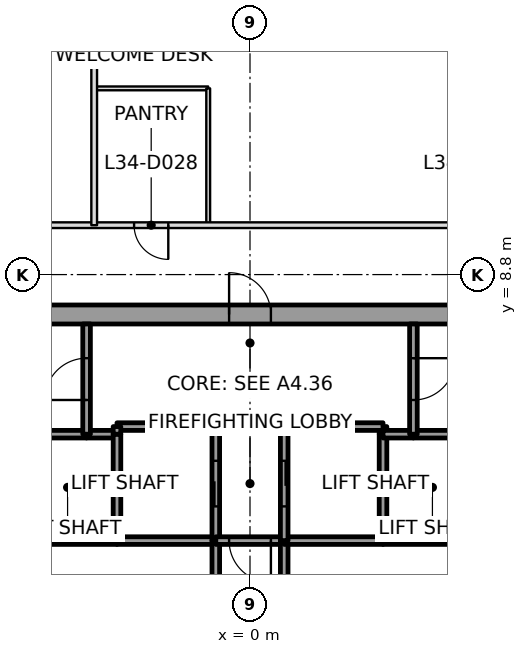
"""IFC4 building model, lengths in metres.
Left out: names, types, materials, properties, quantities, classifications, styles, units other than length and angle.
Written with IfcOpenShell. Run it as: python <this file> out.ifc"""

import sys

from ifc_helpers import new_model, si_unit, direction, frame, frame_2d, origin, place, context, subcontext, project, spatial, rectangle, extrude, element, fill, save


model = new_model("IFC4")
c1 = context("Model", 3, precision=1e-05, world=origin(), true_north=direction((0.0, 1.0)))
c2 = subcontext(c1, "Body", "Model", "MODEL_VIEW")
j1 = project(units=[si_unit("LENGTHUNIT", "METRE"), si_unit("PLANEANGLEUNIT", "RADIAN")], contexts=[c1])
p1 = place(None, origin())
s1 = spatial("IfcSite", under=j1, at=p1, CompositionType="ELEMENT")
p2 = place(p1, origin())
s2 = spatial("IfcBuilding", under=s1, at=p2, CompositionType="ELEMENT")
p3 = place(p2, frame((0.0, 0.0, 157.8)))
s3 = spatial("IfcBuildingStorey", under=s2, at=p3, CompositionType="ELEMENT", Elevation=157.8)
p4 = place(p3, frame((-11.0, 7.75, 0.0), z_axis=(0.0, 0.0, 1.0), x_axis=(1.0, 0.0, 0.0)))
e1 = element("IfcWall", 1, at=p4, inside=s3, PredefinedType="SHEAR", context=c2, shape_type="SweptSolid", body=[
    extrude(rectangle(XDim=22.0, YDim=0.5, at=frame_2d((11.0, 0.0))), origin(), (0.0, 0.0, 1.0), 4.0),
])
p5 = place(p4, frame((10.45, 0.0, 0.0)))
e2 = element("IfcOpeningElement", 2, at=p5, cuts=e1, PredefinedType="OPENING", context=c2, shape_type="SweptSolid", body=[
    extrude(rectangle(XDim=1.1, YDim=2.1, at=frame_2d((0.55, 1.05))), frame((0.0, 0.25, 0.0), z_axis=(0.0, -1.0, 0.0), x_axis=(1.0, 0.0, 0.0)), (0.0, 0.0, 1.0), 0.5),
])
p6 = place(p3, frame((-3.5, 1.8, 0.0), z_axis=(0.0, 0.0, 1.0), x_axis=(-1.0, 0.0, 0.0)))
e3 = element("IfcWall", 3, at=p6, inside=s3, PredefinedType="SOLIDWALL", context=c2, shape_type="SweptSolid", body=[
    extrude(rectangle(XDim=2.6, YDim=0.2, at=frame_2d((1.3, 0.0))), origin(), (0.0, 0.0, 1.0), 3.85),
])
p7 = place(p3, frame((-4.3, 4.6, 0.0), z_axis=(0.0, 0.0, 1.0), x_axis=(-1.0, 0.0, 0.0)))
e4 = element("IfcWall", 4, at=p7, inside=s3, PredefinedType="SOLIDWALL", context=c2, shape_type="SweptSolid", body=[
    extrude(rectangle(XDim=1.8, YDim=0.2, at=frame_2d((0.9, 0.0))), origin(), (0.0, 0.0, 1.0), 3.85),
])
p8 = place(p3, frame((-3.5, 4.6, 0.0), z_axis=(0.0, 0.0, 1.0), x_axis=(-1.0, 0.0, 0.0)))
e5 = element("IfcWall", 5, at=p8, inside=s3, PredefinedType="SOLIDWALL", context=c2, shape_type="SweptSolid", body=[
    extrude(rectangle(XDim=0.8, YDim=0.2, at=frame_2d((0.4, 0.0))), origin(), (0.0, 0.0, 1.0), 3.85),
])
p9 = place(p3, frame((-4.3, 4.6, 0.0), z_axis=(0.0, 0.0, 1.0), x_axis=(0.0, 1.0, 0.0)))
e6 = element("IfcWall", 6, at=p9, inside=s3, PredefinedType="SOLIDWALL", context=c2, shape_type="SweptSolid", body=[
    extrude(rectangle(XDim=2.9, YDim=0.2, at=frame_2d((1.45, 0.0))), origin(), (0.0, 0.0, 1.0), 3.85),
])
p10 = place(p9, frame((0.9, 0.0, 0.0)))
e7 = element("IfcOpeningElement", 7, at=p10, cuts=e6, PredefinedType="OPENING", context=c2, shape_type="SweptSolid", body=[
    extrude(rectangle(XDim=1.1, YDim=2.1, at=frame_2d((0.55, 1.05))), frame((0.0, 0.1, 0.0), z_axis=(0.0, -1.0, 0.0), x_axis=(1.0, 0.0, 0.0)), (0.0, 0.0, 1.0), 0.2),
])
p11 = place(p3, frame((-0.9, 1.8, 0.0), z_axis=(0.0, 0.0, 1.0), x_axis=(-1.0, 0.0, 0.0)))
e8 = element("IfcWall", 8, at=p11, inside=s3, PredefinedType="SOLIDWALL", context=c2, shape_type="SweptSolid", body=[
    extrude(rectangle(XDim=2.6, YDim=0.2, at=frame_2d((1.3, 0.0))), origin(), (0.0, 0.0, 1.0), 3.85),
])
p12 = place(p3, frame((-3.5, 4.6, 0.0), z_axis=(0.0, 0.0, 1.0), x_axis=(0.0, -1.0, 0.0)))
e9 = element("IfcWall", 9, at=p12, inside=s3, PredefinedType="SOLIDWALL", context=c2, shape_type="SweptSolid", body=[
    extrude(rectangle(XDim=2.8, YDim=0.2, at=frame_2d((1.4, 0.0))), origin(), (0.0, 0.0, 1.0), 3.85),
])
p13 = place(p3, frame((-0.9, 1.8, 0.0), z_axis=(0.0, 0.0, 1.0), x_axis=(0.0, 1.0, 0.0)))
e10 = element("IfcWall", 10, at=p13, inside=s3, PredefinedType="SOLIDWALL", context=c2, shape_type="SweptSolid", body=[
    extrude(rectangle(XDim=3.0, YDim=0.2, at=frame_2d((1.5, 0.0))), origin(), (0.0, 0.0, 1.0), 3.85),
])
p14 = place(p13, frame((0.9, 0.0, 0.0)))
e11 = element("IfcOpeningElement", 11, at=p14, cuts=e10, PredefinedType="OPENING", context=c2, shape_type="SweptSolid", body=[
    extrude(rectangle(XDim=1.2, YDim=2.1, at=frame_2d((0.6, 1.05))), frame((0.0, 0.1, 0.0), z_axis=(0.0, -1.0, 0.0), x_axis=(1.0, 0.0, 0.0)), (0.0, 0.0, 1.0), 0.2),
])
p15 = place(p3, frame((-0.9, 4.8, 0.0), z_axis=(0.0, 0.0, 1.0), x_axis=(-1.0, 0.0, 0.0)))
e12 = element("IfcWall", 12, at=p15, inside=s3, PredefinedType="SOLIDWALL", context=c2, shape_type="SweptSolid", body=[
    extrude(rectangle(XDim=2.6, YDim=0.2, at=frame_2d((1.3, 0.0))), origin(), (0.0, 0.0, 1.0), 3.85),
])
p16 = place(p3, frame((-3.5, 4.8, 0.0), z_axis=(0.0, 0.0, 1.0), x_axis=(0.0, -1.0, 0.0)))
e13 = element("IfcWall", 13, at=p16, inside=s3, PredefinedType="SOLIDWALL", context=c2, shape_type="SweptSolid", body=[
    extrude(rectangle(XDim=0.2, YDim=0.2, at=frame_2d((0.1, 0.0))), origin(), (0.0, 0.0, 1.0), 3.85),
])
p17 = place(p3, frame((-0.9, 1.8, 0.0), z_axis=(0.0, 0.0, 1.0), x_axis=(0.0, -1.0, 0.0)))
e14 = element("IfcWall", 14, at=p17, inside=s3, PredefinedType="SOLIDWALL", context=c2, shape_type="SweptSolid", body=[
    extrude(rectangle(XDim=3.6, YDim=0.2, at=frame_2d((1.8, 0.0))), origin(), (0.0, 0.0, 1.0), 3.85),
])
p18 = place(p17, frame((1.05, 0.0, 0.0)))
e15 = element("IfcOpeningElement", 15, at=p18, cuts=e14, PredefinedType="OPENING", context=c2, shape_type="SweptSolid", body=[
    extrude(rectangle(XDim=1.5, YDim=2.1, at=frame_2d((0.75, 1.05))), frame((0.0, 0.1, 0.0), z_axis=(0.0, -1.0, 0.0), x_axis=(1.0, 0.0, 0.0)), (0.0, 0.0, 1.0), 0.2),
])
p19 = place(p3, frame((0.9, 1.8, 0.0), z_axis=(0.0, 0.0, 1.0), x_axis=(-1.0, 0.0, 0.0)))
e16 = element("IfcWall", 16, at=p19, inside=s3, PredefinedType="SOLIDWALL", context=c2, shape_type="SweptSolid", body=[
    extrude(rectangle(XDim=1.8, YDim=0.2, at=frame_2d((0.9, 0.0))), origin(), (0.0, 0.0, 1.0), 3.85),
])
p20 = place(p19, frame((0.35, 0.0, 0.0)))
e17 = element("IfcOpeningElement", 17, at=p20, cuts=e16, PredefinedType="OPENING", context=c2, shape_type="SweptSolid", body=[
    extrude(rectangle(XDim=1.1, YDim=2.1, at=frame_2d((0.55, 1.05))), frame((0.0, 0.1, 0.0), z_axis=(0.0, -1.0, 0.0), x_axis=(1.0, 0.0, 0.0)), (0.0, 0.0, 1.0), 0.2),
])
p21 = place(p3, frame((0.9, -1.8, 0.0), z_axis=(0.0, 0.0, 1.0), x_axis=(0.0, 1.0, 0.0)))
e18 = element("IfcWall", 18, at=p21, inside=s3, PredefinedType="SOLIDWALL", context=c2, shape_type="SweptSolid", body=[
    extrude(rectangle(XDim=3.6, YDim=0.2, at=frame_2d((1.8, 0.0))), origin(), (0.0, 0.0, 1.0), 3.85),
])
p22 = place(p21, frame((1.05, 0.0, 0.0)))
e19 = element("IfcOpeningElement", 19, at=p22, cuts=e18, PredefinedType="OPENING", context=c2, shape_type="SweptSolid", body=[
    extrude(rectangle(XDim=1.5, YDim=2.1, at=frame_2d((0.75, 1.05))), frame((0.0, 0.1, 0.0), z_axis=(0.0, -1.0, 0.0), x_axis=(1.0, 0.0, 0.0)), (0.0, 0.0, 1.0), 0.2),
])
p23 = place(p3, frame((3.5, 1.8, 0.0), z_axis=(0.0, 0.0, 1.0), x_axis=(-1.0, 0.0, 0.0)))
e20 = element("IfcWall", 20, at=p23, inside=s3, PredefinedType="SOLIDWALL", context=c2, shape_type="SweptSolid", body=[
    extrude(rectangle(XDim=2.6, YDim=0.2, at=frame_2d((1.3, 0.0))), origin(), (0.0, 0.0, 1.0), 3.85),
])
p24 = place(p3, frame((3.5, 4.6, 0.0), z_axis=(0.0, 0.0, 1.0), x_axis=(0.0, 1.0, 0.0)))
e21 = element("IfcWall", 21, at=p24, inside=s3, PredefinedType="SOLIDWALL", context=c2, shape_type="SweptSolid", body=[
    extrude(rectangle(XDim=0.2, YDim=0.2, at=frame_2d((0.1, 0.0))), origin(), (0.0, 0.0, 1.0), 3.85),
])
p25 = place(p3, frame((3.5, 4.8, 0.0), z_axis=(0.0, 0.0, 1.0), x_axis=(-1.0, 0.0, 0.0)))
e22 = element("IfcWall", 22, at=p25, inside=s3, PredefinedType="SOLIDWALL", context=c2, shape_type="SweptSolid", body=[
    extrude(rectangle(XDim=2.6, YDim=0.2, at=frame_2d((1.3, 0.0))), origin(), (0.0, 0.0, 1.0), 3.85),
])
p26 = place(p3, frame((0.9, 4.8, 0.0), z_axis=(0.0, 0.0, 1.0), x_axis=(0.0, -1.0, 0.0)))
e23 = element("IfcWall", 23, at=p26, inside=s3, PredefinedType="SOLIDWALL", context=c2, shape_type="SweptSolid", body=[
    extrude(rectangle(XDim=3.0, YDim=0.2, at=frame_2d((1.5, 0.0))), origin(), (0.0, 0.0, 1.0), 3.85),
])
p27 = place(p26, frame((0.9, 0.0, 0.0)))
e24 = element("IfcOpeningElement", 24, at=p27, cuts=e23, PredefinedType="OPENING", context=c2, shape_type="SweptSolid", body=[
    extrude(rectangle(XDim=1.2, YDim=2.1, at=frame_2d((0.6, 1.05))), frame((0.0, 0.1, 0.0), z_axis=(0.0, -1.0, 0.0), x_axis=(1.0, 0.0, 0.0)), (0.0, 0.0, 1.0), 0.2),
])
p28 = place(p3, frame((6.1, 1.8, 0.0), z_axis=(0.0, 0.0, 1.0), x_axis=(-1.0, 0.0, 0.0)))
e25 = element("IfcWall", 25, at=p28, inside=s3, PredefinedType="SOLIDWALL", context=c2, shape_type="SweptSolid", body=[
    extrude(rectangle(XDim=2.6, YDim=0.2, at=frame_2d((1.3, 0.0))), origin(), (0.0, 0.0, 1.0), 3.85),
])
p29 = place(p3, frame((3.5, 1.8, 0.0), z_axis=(0.0, 0.0, 1.0), x_axis=(0.0, 1.0, 0.0)))
e26 = element("IfcWall", 26, at=p29, inside=s3, PredefinedType="SOLIDWALL", context=c2, shape_type="SweptSolid", body=[
    extrude(rectangle(XDim=2.8, YDim=0.2, at=frame_2d((1.4, 0.0))), origin(), (0.0, 0.0, 1.0), 3.85),
])
p30 = place(p3, frame((4.3, 4.6, 0.0), z_axis=(0.0, 0.0, 1.0), x_axis=(-1.0, 0.0, 0.0)))
e27 = element("IfcWall", 27, at=p30, inside=s3, PredefinedType="SOLIDWALL", context=c2, shape_type="SweptSolid", body=[
    extrude(rectangle(XDim=0.8, YDim=0.2, at=frame_2d((0.4, 0.0))), origin(), (0.0, 0.0, 1.0), 3.85),
])
p31 = place(p3, frame((6.1, 4.6, 0.0), z_axis=(0.0, 0.0, 1.0), x_axis=(-1.0, 0.0, 0.0)))
e28 = element("IfcWall", 28, at=p31, inside=s3, PredefinedType="SOLIDWALL", context=c2, shape_type="SweptSolid", body=[
    extrude(rectangle(XDim=1.8, YDim=0.2, at=frame_2d((0.9, 0.0))), origin(), (0.0, 0.0, 1.0), 3.85),
])
p32 = place(p3, frame((4.3, 7.5, 0.0), z_axis=(0.0, 0.0, 1.0), x_axis=(0.0, -1.0, 0.0)))
e29 = element("IfcWall", 29, at=p32, inside=s3, PredefinedType="SOLIDWALL", context=c2, shape_type="SweptSolid", body=[
    extrude(rectangle(XDim=2.9, YDim=0.2, at=frame_2d((1.45, 0.0))), origin(), (0.0, 0.0, 1.0), 3.85),
])
p33 = place(p32, frame((0.9, 0.0, 0.0)))
e30 = element("IfcOpeningElement", 30, at=p33, cuts=e29, PredefinedType="OPENING", context=c2, shape_type="SweptSolid", body=[
    extrude(rectangle(XDim=1.1, YDim=2.1, at=frame_2d((0.55, 1.05))), frame((0.0, 0.1, 0.0), z_axis=(0.0, -1.0, 0.0), x_axis=(1.0, 0.0, 0.0)), (0.0, 0.0, 1.0), 0.2),
])
p34 = place(p3, frame((-4.1, 10.1, 0.0), z_axis=(0.0, 0.0, 1.0), x_axis=(0.0, 1.0, 0.0)))
e31 = element("IfcWall", 31, at=p34, inside=s3, PredefinedType="PARTITIONING", context=c2, shape_type="SweptSolid", body=[
    extrude(rectangle(XDim=12.233, YDim=0.15, at=frame_2d((6.116, 0.0))), origin(), (0.0, 0.0, 1.0), 3.247),
])
p35 = place(p3, frame((12.484, 10.1, 0.0), z_axis=(0.0, 0.0, 1.0), x_axis=(-1.0, 0.0, 0.0)))
e32 = element("IfcWall", 32, at=p35, inside=s3, PredefinedType="PARTITIONING", context=c2, shape_type="SweptSolid", body=[
    extrude(rectangle(XDim=25.504, YDim=0.15, at=frame_2d((12.752, 0.0))), origin(), (0.0, 0.0, 1.0), 3.166),
])
p36 = place(p35, frame((14.634, 0.0, 0.0)))
e33 = element("IfcOpeningElement", 33, at=p36, cuts=e32, PredefinedType="OPENING", context=c2, shape_type="SweptSolid", body=[
    extrude(rectangle(XDim=0.9, YDim=2.1, at=frame_2d((0.45, 1.05))), frame((0.0, 0.075, 0.0), z_axis=(0.0, -1.0, 0.0), x_axis=(1.0, 0.0, 0.0)), (0.0, 0.0, 1.0), 0.15),
])
p37 = place(p35, frame((6.196, 0.0, 0.0)))
e34 = element("IfcOpeningElement", 34, at=p37, cuts=e32, PredefinedType="OPENING", context=c2, shape_type="SweptSolid", body=[
    extrude(rectangle(XDim=1.0, YDim=2.1, at=frame_2d((0.5, 1.05))), frame((0.0, 0.075, 0.0), z_axis=(0.0, -1.0, 0.0), x_axis=(1.0, 0.0, 0.0)), (0.0, 0.0, 1.0), 0.15),
])
p38 = place(p35, frame((20.584, 0.0, 0.0)))
e35 = element("IfcOpeningElement", 35, at=p38, cuts=e32, PredefinedType="OPENING", context=c2, shape_type="SweptSolid", body=[
    extrude(rectangle(XDim=1.0, YDim=2.1, at=frame_2d((0.5, 1.05))), frame((0.0, 0.075, 0.0), z_axis=(0.0, -1.0, 0.0), x_axis=(1.0, 0.0, 0.0)), (0.0, 0.0, 1.0), 0.15),
])
p39 = place(p3, frame((-4.07, 13.7, 0.0), z_axis=(0.0, 0.0, 1.0), x_axis=(1.0, 0.0, 0.0)))
e36 = element("IfcWall", 36, at=p39, inside=s3, PredefinedType="PARTITIONING", context=c2, shape_type="SweptSolid", body=[
    extrude(rectangle(XDim=2.97, YDim=0.1, at=frame_2d((1.485, 0.0))), origin(), (0.0, 0.0, 1.0), 3.45),
])
p40 = place(p3, frame((-1.1, 13.7, 0.0), z_axis=(0.0, 0.0, 1.0), x_axis=(0.0, -1.0, 0.0)))
e37 = element("IfcWall", 37, at=p40, inside=s3, PredefinedType="PARTITIONING", context=c2, shape_type="SweptSolid", body=[
    extrude(rectangle(XDim=3.57, YDim=0.1, at=frame_2d((1.785, 0.0))), origin(), (0.0, 0.0, 1.0), 3.247),
])
p41 = place(p36, origin())
e38 = element("IfcDoor", 38, at=p41, inside=s3, OperationType="SINGLE_SWING_RIGHT", PredefinedType="DOOR", context=c2, shape_type="SweptSolid", body=[
    extrude(rectangle(XDim=0.9, YDim=2.1, at=frame_2d((0.45, 1.05))), frame((0.0, 0.025, 0.0), z_axis=(0.0, -1.0, 0.0), x_axis=(1.0, 0.0, 0.0)), (0.0, 0.0, 1.0), 0.05),
])
fill(e33, e38)
p42 = place(p14, origin())
e39 = element("IfcDoor", 39, at=p42, inside=s3, OperationType="SLIDING_TO_LEFT", PredefinedType="DOOR", context=c2, shape_type="SweptSolid", body=[
    extrude(rectangle(XDim=1.2, YDim=2.1, at=frame_2d((0.6, 1.05))), frame((0.0, 0.025, 0.0), z_axis=(0.0, -1.0, 0.0), x_axis=(1.0, 0.0, 0.0)), (0.0, 0.0, 1.0), 0.05),
])
fill(e11, e39)
p43 = place(p27, origin())
e40 = element("IfcDoor", 40, at=p43, inside=s3, OperationType="SLIDING_TO_RIGHT", PredefinedType="DOOR", context=c2, shape_type="SweptSolid", body=[
    extrude(rectangle(XDim=1.2, YDim=2.1, at=frame_2d((0.6, 1.05))), frame((0.0, 0.025, 0.0), z_axis=(0.0, -1.0, 0.0), x_axis=(1.0, 0.0, 0.0)), (0.0, 0.0, 1.0), 0.05),
])
fill(e24, e40)
p44 = place(p20, origin())
e41 = element("IfcDoor", 41, at=p44, inside=s3, OperationType="SINGLE_SWING_RIGHT", PredefinedType="DOOR", context=c2, shape_type="SweptSolid", body=[
    extrude(rectangle(XDim=1.1, YDim=2.1, at=frame_2d((0.55, 1.05))), frame((0.0, 0.025, 0.0), z_axis=(0.0, -1.0, 0.0), x_axis=(1.0, 0.0, 0.0)), (0.0, 0.0, 1.0), 0.05),
])
fill(e17, e41)
p45 = place(p10, origin())
e42 = element("IfcDoor", 42, at=p45, inside=s3, OperationType="SINGLE_SWING_RIGHT", PredefinedType="DOOR", context=c2, shape_type="SweptSolid", body=[
    extrude(rectangle(XDim=1.1, YDim=2.1, at=frame_2d((0.55, 1.05))), frame((0.0, 0.025, 0.0), z_axis=(0.0, -1.0, 0.0), x_axis=(1.0, 0.0, 0.0)), (0.0, 0.0, 1.0), 0.05),
])
fill(e7, e42)
p46 = place(p33, origin())
e43 = element("IfcDoor", 43, at=p46, inside=s3, OperationType="SINGLE_SWING_RIGHT", PredefinedType="DOOR", context=c2, shape_type="SweptSolid", body=[
    extrude(rectangle(XDim=1.1, YDim=2.1, at=frame_2d((0.55, 1.05))), frame((0.0, 0.025, 0.0), z_axis=(0.0, -1.0, 0.0), x_axis=(1.0, 0.0, 0.0)), (0.0, 0.0, 1.0), 0.05),
])
fill(e30, e43)
p47 = place(p5, origin())
e44 = element("IfcDoor", 44, at=p47, inside=s3, OperationType="SINGLE_SWING_LEFT", PredefinedType="DOOR", context=c2, shape_type="SweptSolid", body=[
    extrude(rectangle(XDim=1.1, YDim=2.1, at=frame_2d((0.55, 1.05))), frame((0.0, 0.025, 0.0), z_axis=(0.0, -1.0, 0.0), x_axis=(1.0, 0.0, 0.0)), (0.0, 0.0, 1.0), 0.05),
])
fill(e2, e44)
save(model, sys.argv[1])
